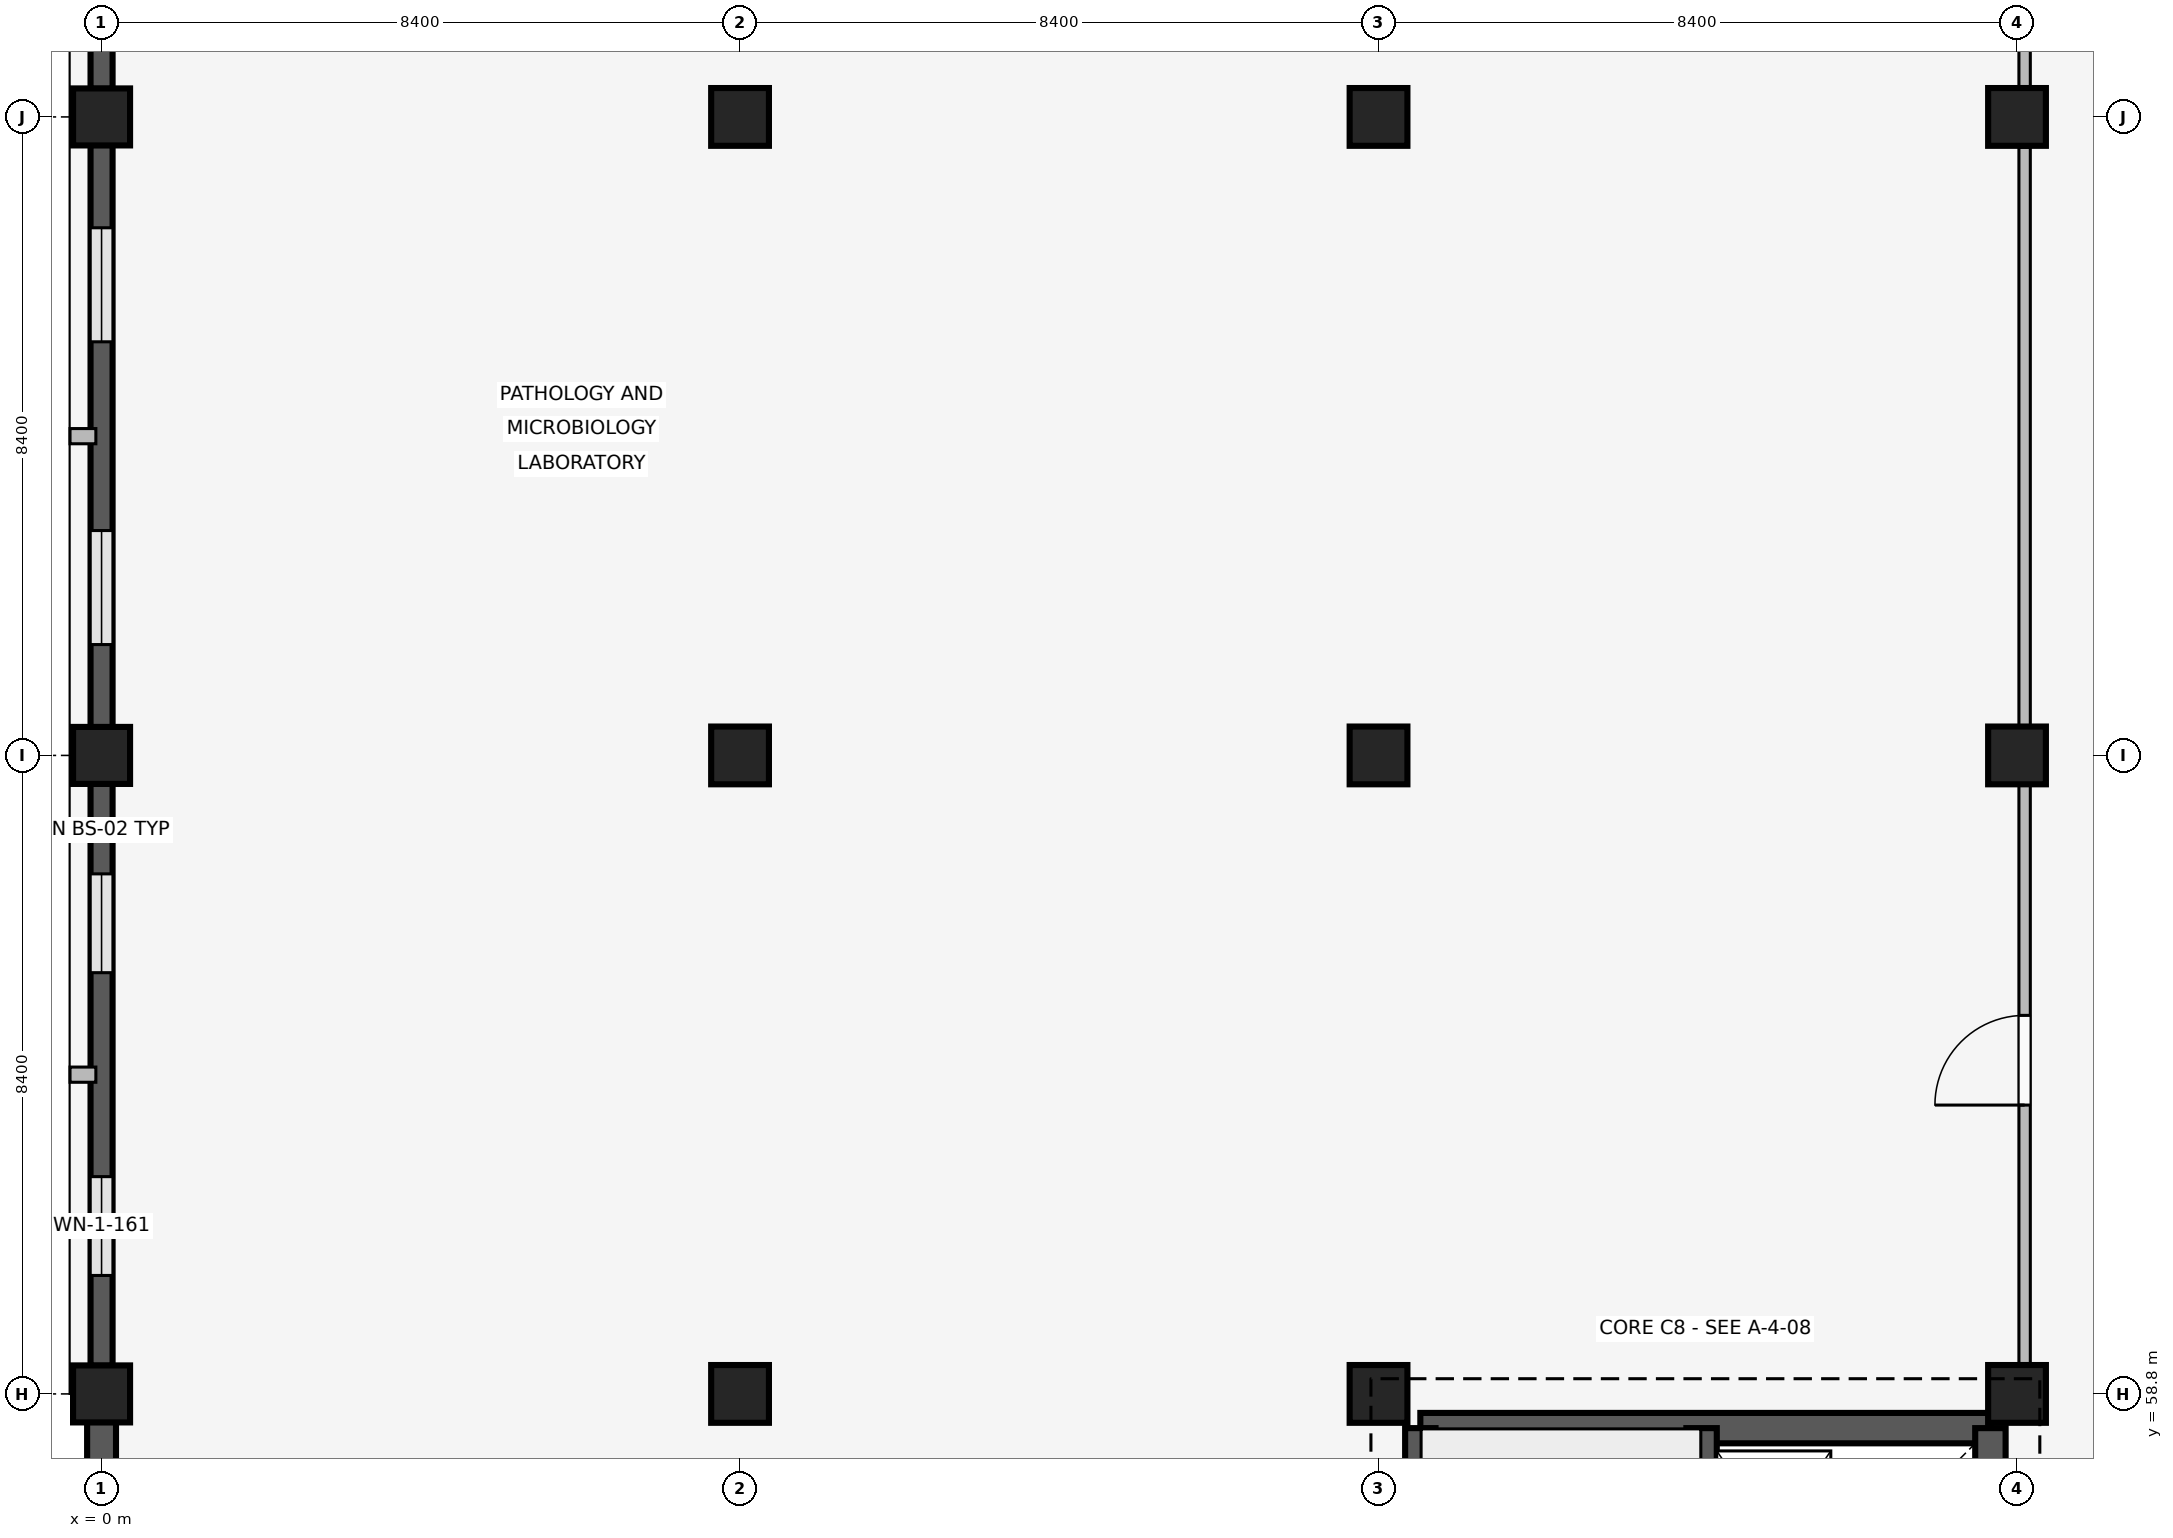
"""IFC4 building model, lengths in metres.
Left out: names, types, materials, properties, quantities, classifications, styles, units other than length and angle.
Written with IfcOpenShell. Run it as: python <this file> out.ifc"""

import sys

from ifc_helpers import new_model, si_unit, direction, frame, frame_2d, origin, origin_2d, place, context, subcontext, project, spatial, rectangle, extrude, element, fill, save


model = new_model("IFC4")
c1 = context("Model", 3, precision=1e-05, world=origin(), true_north=direction((0.0, 1.0)))
c2 = subcontext(c1, "Body", "Model", "MODEL_VIEW")
j1 = project(units=[si_unit("LENGTHUNIT", "METRE"), si_unit("PLANEANGLEUNIT", "RADIAN")], contexts=[c1])
p1 = place(None, origin())
s1 = spatial("IfcSite", under=j1, at=p1, CompositionType="ELEMENT")
p2 = place(p1, origin())
s2 = spatial("IfcBuilding", under=s1, at=p2, CompositionType="ELEMENT")
p3 = place(p2, frame((0.0, 0.0, 4.8)))
s3 = spatial("IfcBuildingStorey", under=s2, at=p3, CompositionType="ELEMENT", Elevation=4.8)
for number, where, z_axis, x_axis in (
    (1, (0.0, 58.8, 0.0), (0.0, 0.0, 1.0), (1.0, 0.0, 0.0)),
    (2, (0.0, 67.2, 0.0), (0.0, 0.0, 1.0), (1.0, 0.0, 0.0)),
    (3, (0.0, 75.6, 0.0), (0.0, 0.0, 1.0), (1.0, 0.0, 0.0)),
):
    element("IfcColumn", number, at=place(p3, frame(where, z_axis=z_axis, x_axis=x_axis)), inside=s3, PredefinedType="COLUMN", context=c2, shape_type="SweptSolid", body=[
        extrude(rectangle(XDim=0.75, YDim=0.75, at=origin_2d()), origin(), (0.0, 0.0, 1.0), 3.3),
    ])
for number, where, z_axis, x_axis in (
    (4, (8.4, 58.8, 0.0), (0.0, 0.0, 1.0), (1.0, 0.0, 0.0)),
    (5, (8.4, 67.2, 0.0), (0.0, 0.0, 1.0), (1.0, 0.0, 0.0)),
    (6, (8.4, 75.6, 0.0), (0.0, 0.0, 1.0), (1.0, 0.0, 0.0)),
    (7, (16.8, 58.8, 0.0), (0.0, 0.0, 1.0), (1.0, 0.0, 0.0)),
    (8, (16.8, 67.2, 0.0), (0.0, 0.0, 1.0), (1.0, 0.0, 0.0)),
    (9, (16.8, 75.6, 0.0), (0.0, 0.0, 1.0), (1.0, 0.0, 0.0)),
    (10, (25.2, 58.8, 0.0), (0.0, 0.0, 1.0), (1.0, 0.0, 0.0)),
    (11, (25.2, 67.2, 0.0), (0.0, 0.0, 1.0), (1.0, 0.0, 0.0)),
    (12, (25.2, 75.6, 0.0), (0.0, 0.0, 1.0), (1.0, 0.0, 0.0)),
):
    element("IfcColumn", number, at=place(p3, frame(where, z_axis=z_axis, x_axis=x_axis)), inside=s3, PredefinedType="COLUMN", context=c2, shape_type="SweptSolid", body=[
        extrude(rectangle(XDim=0.76, YDim=0.76, at=origin_2d()), origin(), (0.0, 0.0, 1.0), 3.3),
    ])
p4 = place(p3, frame((0.0, 50.77, 0.0), z_axis=(0.0, 0.0, 1.0), x_axis=(0.0, 1.0, 0.0)))
e13 = element("IfcWall", 13, at=p4, inside=s3, PredefinedType="SOLIDWALL", context=c2, shape_type="SweptSolid", body=[
    extrude(rectangle(XDim=7.66, YDim=0.38, at=frame_2d((3.83, 0.0))), origin(), (0.0, 0.0, 1.0), 2.42),
])
p5 = place(p3, frame((0.0, 59.17, 0.0), z_axis=(0.0, 0.0, 1.0), x_axis=(0.0, 1.0, 0.0)))
e14 = element("IfcWall", 14, at=p5, inside=s3, PredefinedType="SOLIDWALL", context=c2, shape_type="SweptSolid", body=[
    extrude(rectangle(XDim=7.66, YDim=0.29, at=frame_2d((3.83, 0.0))), origin(), (0.0, 0.0, 1.0), 2.42),
])
p6 = place(p5, frame((1.188, 0.0, 1.05)))
e15 = element("IfcOpeningElement", 15, at=p6, cuts=e14, PredefinedType="OPENING", context=c2, shape_type="SweptSolid", body=[
    extrude(rectangle(XDim=1.3, YDim=0.75, at=frame_2d((0.65, 0.375))), frame((0.0, 0.155, 0.0), z_axis=(0.0, -1.0, 0.0), x_axis=(1.0, 0.0, 0.0)), (0.0, 0.0, 1.0), 0.31),
])
p7 = place(p5, frame((5.172, 0.0, 1.05)))
e16 = element("IfcOpeningElement", 16, at=p7, cuts=e14, PredefinedType="OPENING", context=c2, shape_type="SweptSolid", body=[
    extrude(rectangle(XDim=1.3, YDim=0.75, at=frame_2d((0.65, 0.375))), frame((0.0, 0.155, 0.0), z_axis=(0.0, -1.0, 0.0), x_axis=(1.0, 0.0, 0.0)), (0.0, 0.0, 1.0), 0.31),
])
p8 = place(p3, frame((-0.075, 63.0, 0.0), z_axis=(0.0, 0.0, 1.0), x_axis=(-1.0, 0.0, 0.0)))
e17 = element("IfcWall", 17, at=p8, inside=s3, PredefinedType="ELEMENTEDWALL", context=c2, shape_type="SweptSolid", body=[
    extrude(rectangle(XDim=0.34, YDim=0.2, at=frame_2d((0.17, 0.0))), origin(), (0.0, 0.0, 1.0), 2.4),
])
p9 = place(p3, frame((0.0, 67.57, 0.0), z_axis=(0.0, 0.0, 1.0), x_axis=(0.0, 1.0, 0.0)))
e18 = element("IfcWall", 18, at=p9, inside=s3, PredefinedType="SOLIDWALL", context=c2, shape_type="SweptSolid", body=[
    extrude(rectangle(XDim=7.66, YDim=0.29, at=frame_2d((3.83, 0.0))), origin(), (0.0, 0.0, 1.0), 2.42),
])
p10 = place(p9, frame((1.088, 0.0, 1.05)))
e19 = element("IfcOpeningElement", 19, at=p10, cuts=e18, PredefinedType="OPENING", context=c2, shape_type="SweptSolid", body=[
    extrude(rectangle(XDim=1.5, YDim=0.75, at=frame_2d((0.75, 0.375))), frame((0.0, 0.155, 0.0), z_axis=(0.0, -1.0, 0.0), x_axis=(1.0, 0.0, 0.0)), (0.0, 0.0, 1.0), 0.31),
])
p11 = place(p9, frame((5.072, 0.0, 1.05)))
e20 = element("IfcOpeningElement", 20, at=p11, cuts=e18, PredefinedType="OPENING", context=c2, shape_type="SweptSolid", body=[
    extrude(rectangle(XDim=1.5, YDim=0.75, at=frame_2d((0.75, 0.375))), frame((0.0, 0.155, 0.0), z_axis=(0.0, -1.0, 0.0), x_axis=(1.0, 0.0, 0.0)), (0.0, 0.0, 1.0), 0.31),
])
p12 = place(p3, frame((-0.075, 71.4, 0.0), z_axis=(0.0, 0.0, 1.0), x_axis=(-1.0, 0.0, 0.0)))
e21 = element("IfcWall", 21, at=p12, inside=s3, PredefinedType="ELEMENTEDWALL", context=c2, shape_type="SweptSolid", body=[
    extrude(rectangle(XDim=0.34, YDim=0.2, at=frame_2d((0.17, 0.0))), origin(), (0.0, 0.0, 1.0), 2.4),
])
p13 = place(p3, frame((0.0, 75.97, 0.0), z_axis=(0.0, 0.0, 1.0), x_axis=(0.0, 1.0, 0.0)))
e22 = element("IfcWall", 22, at=p13, inside=s3, PredefinedType="SOLIDWALL", context=c2, shape_type="SweptSolid", body=[
    extrude(rectangle(XDim=7.66, YDim=0.29, at=frame_2d((3.83, 0.0))), origin(), (0.0, 0.0, 1.0), 2.42),
])
p14 = place(p13, frame((1.188, 0.0, 1.05)))
e23 = element("IfcOpeningElement", 23, at=p14, cuts=e22, PredefinedType="OPENING", context=c2, shape_type="SweptSolid", body=[
    extrude(rectangle(XDim=1.3, YDim=0.75, at=frame_2d((0.65, 0.375))), frame((0.0, 0.155, 0.0), z_axis=(0.0, -1.0, 0.0), x_axis=(1.0, 0.0, 0.0)), (0.0, 0.0, 1.0), 0.31),
])
p15 = place(p13, frame((5.172, 0.0, 1.05)))
e24 = element("IfcOpeningElement", 24, at=p15, cuts=e22, PredefinedType="OPENING", context=c2, shape_type="SweptSolid", body=[
    extrude(rectangle(XDim=1.3, YDim=0.75, at=frame_2d((0.65, 0.375))), frame((0.0, 0.155, 0.0), z_axis=(0.0, -1.0, 0.0), x_axis=(1.0, 0.0, 0.0)), (0.0, 0.0, 1.0), 0.31),
])
p16 = place(p3, frame((17.35, 58.35, 0.0), z_axis=(0.0, 0.0, 1.0), x_axis=(1.0, 0.0, 0.0)))
e25 = element("IfcWall", 25, at=p16, inside=s3, PredefinedType="SHEAR", context=c2, shape_type="SweptSolid", body=[
    extrude(rectangle(XDim=7.5, YDim=0.4, at=frame_2d((3.75, 0.0))), origin(), (0.0, 0.0, 1.0), 3.02),
])
p17 = place(p3, frame((17.35, 50.8, 0.0), z_axis=(0.0, 0.0, 1.0), x_axis=(0.0, 1.0, 0.0)))
e26 = element("IfcWall", 26, at=p17, inside=s3, PredefinedType="SHEAR", context=c2, shape_type="SweptSolid", body=[
    extrude(rectangle(XDim=7.55, YDim=0.4, at=frame_2d((3.775, 0.0))), origin(), (0.0, 0.0, 1.0), 3.02),
])
p18 = place(p3, frame((24.85, 50.8, 0.0), z_axis=(0.0, 0.0, 1.0), x_axis=(0.0, 1.0, 0.0)))
e27 = element("IfcWall", 27, at=p18, inside=s3, PredefinedType="SHEAR", context=c2, shape_type="SweptSolid", body=[
    extrude(rectangle(XDim=7.55, YDim=0.4, at=frame_2d((3.775, 0.0))), origin(), (0.0, 0.0, 1.0), 3.02),
])
p19 = place(p18, frame((2.4, 0.0, 0.0)))
e28 = element("IfcOpeningElement", 28, at=p19, cuts=e27, PredefinedType="OPENING", context=c2, shape_type="SweptSolid", body=[
    extrude(rectangle(XDim=1.2, YDim=2.2, at=frame_2d((0.6, 1.1))), frame((0.0, 0.21, 0.0), z_axis=(0.0, -1.0, 0.0), x_axis=(1.0, 0.0, 0.0)), (0.0, 0.0, 1.0), 0.42),
])
p20 = place(p3, frame((21.05, 50.8, 0.0), z_axis=(0.0, 0.0, 1.0), x_axis=(0.0, 1.0, 0.0)))
e29 = element("IfcWall", 29, at=p20, inside=s3, PredefinedType="SHEAR", context=c2, shape_type="SweptSolid", body=[
    extrude(rectangle(XDim=7.55, YDim=0.4, at=frame_2d((3.775, 0.0))), origin(), (0.0, 0.0, 1.0), 3.02),
])
p21 = place(p20, frame((0.28, 0.0, 0.0)))
e30 = element("IfcOpeningElement", 30, at=p21, cuts=e29, PredefinedType="OPENING", context=c2, shape_type="SweptSolid", body=[
    extrude(rectangle(XDim=1.0, YDim=2.15, at=frame_2d((0.5, 1.075))), frame((0.0, 0.21, 0.0), z_axis=(0.0, -1.0, 0.0), x_axis=(1.0, 0.0, 0.0)), (0.0, 0.0, 1.0), 0.42),
])
p22 = place(p3, frame((25.3, 59.2, 0.0), z_axis=(0.0, 0.0, 1.0), x_axis=(0.0, 1.0, 0.0)))
e31 = element("IfcWall", 31, at=p22, inside=s3, PredefinedType="PARTITIONING", context=c2, shape_type="SweptSolid", body=[
    extrude(rectangle(XDim=16.0, YDim=0.15, at=frame_2d((8.0, 0.0))), origin(), (0.0, 0.0, 1.0), 2.4),
])
p23 = place(p22, frame((3.4, 0.0, 0.0)))
e32 = element("IfcOpeningElement", 32, at=p23, cuts=e31, PredefinedType="OPENING", context=c2, shape_type="SweptSolid", body=[
    extrude(rectangle(XDim=1.18, YDim=2.2, at=frame_2d((0.59, 1.1))), frame((0.0, 0.085, 0.0), z_axis=(0.0, -1.0, 0.0), x_axis=(1.0, 0.0, 0.0)), (0.0, 0.0, 1.0), 0.17),
])
p24 = place(p3, frame((25.3, 76.0, 0.0), z_axis=(0.0, 0.0, 1.0), x_axis=(0.0, 1.0, 0.0)))
e33 = element("IfcWall", 33, at=p24, inside=s3, PredefinedType="PARTITIONING", context=c2, shape_type="SweptSolid", body=[
    extrude(rectangle(XDim=16.0, YDim=0.15, at=frame_2d((8.0, 0.0))), origin(), (0.0, 0.0, 1.0), 2.4),
])
p25 = place(p24, frame((3.4, 0.0, 0.0)))
e34 = element("IfcOpeningElement", 34, at=p25, cuts=e33, PredefinedType="OPENING", context=c2, shape_type="SweptSolid", body=[
    extrude(rectangle(XDim=1.4, YDim=2.25, at=frame_2d((0.7, 1.125))), frame((0.0, 0.085, 0.0), z_axis=(0.0, -1.0, 0.0), x_axis=(1.0, 0.0, 0.0)), (0.0, 0.0, 1.0), 0.17),
])
p26 = place(p6, origin())
e35 = element("IfcWindow", 35, at=p26, inside=s3, PartitioningType="SINGLE_PANEL", PredefinedType="WINDOW", context=c2, shape_type="SweptSolid", body=[
    extrude(rectangle(XDim=1.3, YDim=0.75, at=frame_2d((0.65, 0.375))), frame((0.0, 0.03, 0.0), z_axis=(0.0, -1.0, 0.0), x_axis=(1.0, 0.0, 0.0)), (0.0, 0.0, 1.0), 0.06),
])
fill(e15, e35)
p27 = place(p7, origin())
e36 = element("IfcWindow", 36, at=p27, inside=s3, PartitioningType="SINGLE_PANEL", PredefinedType="WINDOW", context=c2, shape_type="SweptSolid", body=[
    extrude(rectangle(XDim=1.3, YDim=0.75, at=frame_2d((0.65, 0.375))), frame((0.0, 0.03, 0.0), z_axis=(0.0, -1.0, 0.0), x_axis=(1.0, 0.0, 0.0)), (0.0, 0.0, 1.0), 0.06),
])
fill(e16, e36)
p28 = place(p10, origin())
e37 = element("IfcWindow", 37, at=p28, inside=s3, PartitioningType="SINGLE_PANEL", PredefinedType="WINDOW", context=c2, shape_type="SweptSolid", body=[
    extrude(rectangle(XDim=1.5, YDim=0.75, at=frame_2d((0.75, 0.375))), frame((0.0, 0.03, 0.0), z_axis=(0.0, -1.0, 0.0), x_axis=(1.0, 0.0, 0.0)), (0.0, 0.0, 1.0), 0.06),
])
fill(e19, e37)
p29 = place(p11, origin())
e38 = element("IfcWindow", 38, at=p29, inside=s3, PartitioningType="SINGLE_PANEL", PredefinedType="WINDOW", context=c2, shape_type="SweptSolid", body=[
    extrude(rectangle(XDim=1.5, YDim=0.75, at=frame_2d((0.75, 0.375))), frame((0.0, 0.03, 0.0), z_axis=(0.0, -1.0, 0.0), x_axis=(1.0, 0.0, 0.0)), (0.0, 0.0, 1.0), 0.06),
])
fill(e20, e38)
p30 = place(p23, origin())
e39 = element("IfcDoor", 39, at=p30, inside=s3, OperationType="SINGLE_SWING_LEFT", PredefinedType="DOOR", context=c2, shape_type="SweptSolid", body=[
    extrude(rectangle(XDim=1.18, YDim=2.2, at=frame_2d((0.59, 1.1))), frame((0.0, 0.025, 0.0), z_axis=(0.0, -1.0, 0.0), x_axis=(1.0, 0.0, 0.0)), (0.0, 0.0, 1.0), 0.05),
])
fill(e32, e39)
save(model, sys.argv[1])
